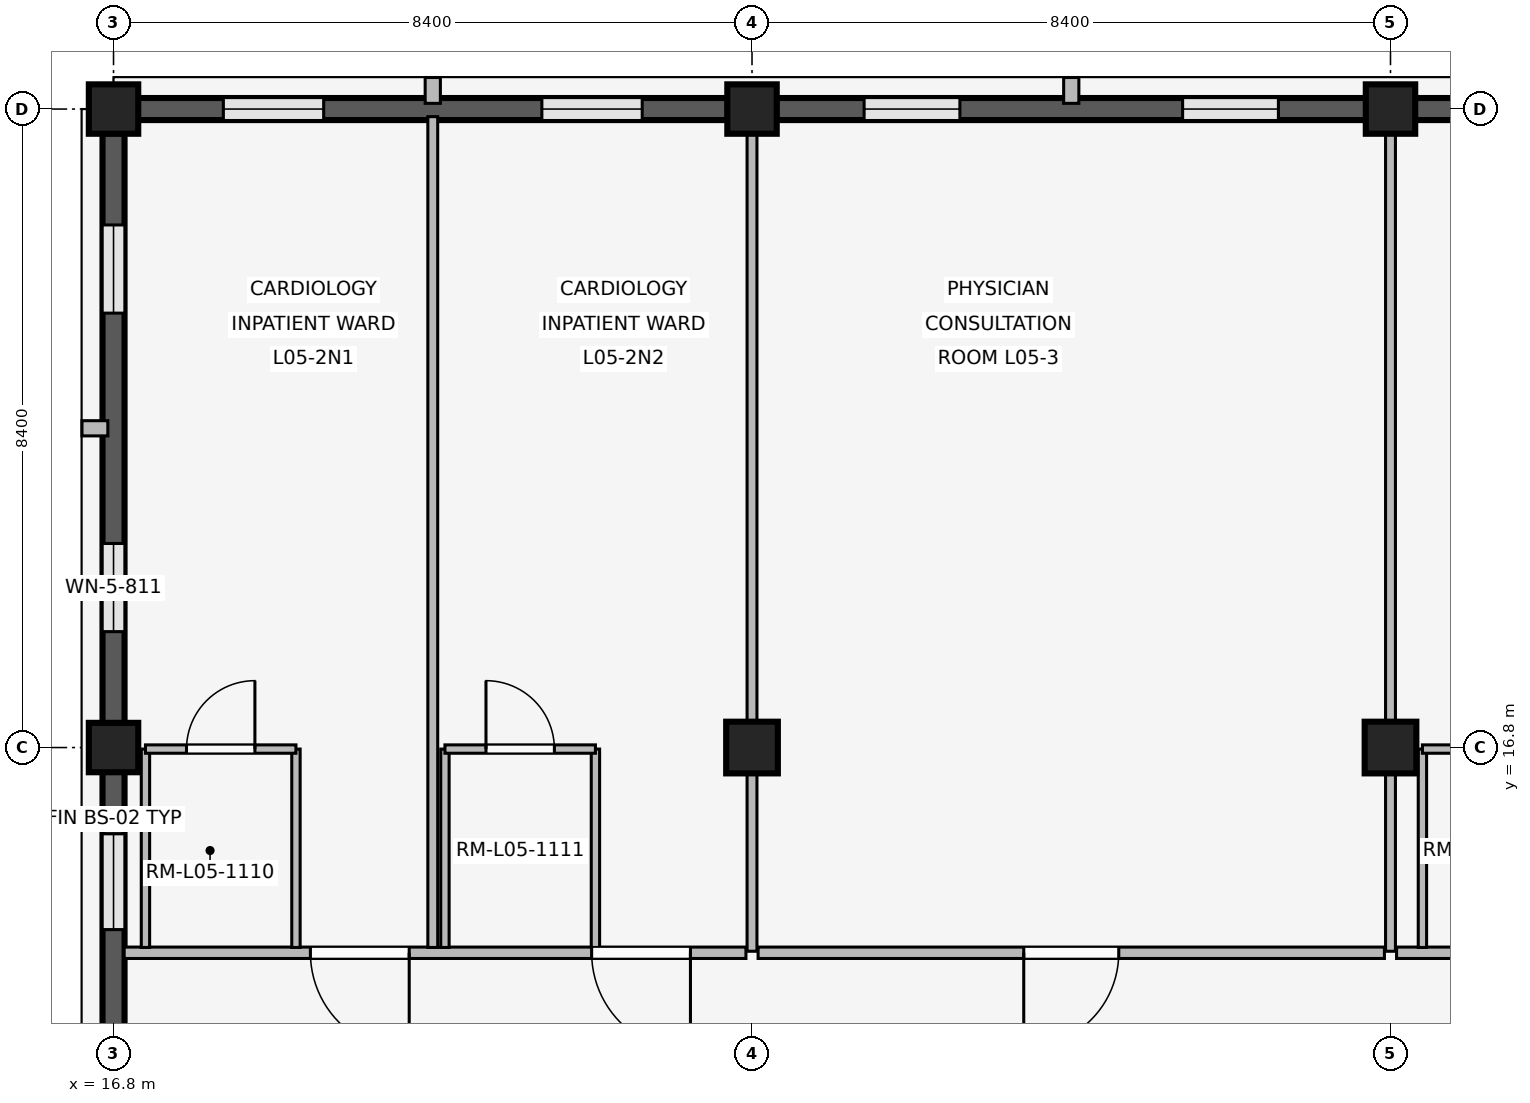
"""IFC4 building model, lengths in metres.
Left out: names, types, materials, properties, quantities, classifications, styles, units other than length and angle.
Written with IfcOpenShell. Run it as: python <this file> out.ifc"""

import sys

from ifc_helpers import new_model, si_unit, direction, frame, frame_2d, origin, origin_2d, place, context, subcontext, project, spatial, rectangle, extrude, element, fill, save


model = new_model("IFC4")
c1 = context("Model", 3, precision=1e-05, world=origin(), true_north=direction((0.0, 1.0)))
c2 = subcontext(c1, "Body", "Model", "MODEL_VIEW")
j1 = project(units=[si_unit("LENGTHUNIT", "METRE"), si_unit("PLANEANGLEUNIT", "RADIAN")], contexts=[c1])
p1 = place(None, origin())
s1 = spatial("IfcSite", under=j1, at=p1, CompositionType="ELEMENT")
p2 = place(p1, origin())
s2 = spatial("IfcBuilding", under=s1, at=p2, CompositionType="ELEMENT")
p3 = place(p2, frame((0.0, 0.0, 20.4)))
s3 = spatial("IfcBuildingStorey", under=s2, at=p3, CompositionType="ELEMENT", Elevation=20.4)
for number, where, z_axis, x_axis in (
    (1, (16.8, 16.8, 0.0), (0.0, 0.0, 1.0), (1.0, 0.0, 0.0)),
    (2, (16.8, 25.2, 0.0), (0.0, 0.0, 1.0), (1.0, 0.0, 0.0)),
):
    element("IfcColumn", number, at=place(p3, frame(where, z_axis=z_axis, x_axis=x_axis)), inside=s3, PredefinedType="COLUMN", context=c2, shape_type="SweptSolid", body=[
        extrude(rectangle(XDim=0.65, YDim=0.65, at=origin_2d()), origin(), (0.0, 0.0, 1.0), 4.2),
    ])
p4 = place(p3, frame((25.2, 16.8, 0.0), z_axis=(0.0, 0.0, 1.0), x_axis=(1.0, 0.0, 0.0)))
e3 = element("IfcColumn", 3, at=p4, inside=s3, PredefinedType="COLUMN", context=c2, shape_type="SweptSolid", body=[
    extrude(rectangle(XDim=0.68, YDim=0.68, at=origin_2d()), origin(), (0.0, 0.0, 1.0), 4.2),
])
p5 = place(p3, frame((25.2, 25.2, 0.0), z_axis=(0.0, 0.0, 1.0), x_axis=(1.0, 0.0, 0.0)))
e4 = element("IfcColumn", 4, at=p5, inside=s3, PredefinedType="COLUMN", context=c2, shape_type="SweptSolid", body=[
    extrude(rectangle(XDim=0.65, YDim=0.65, at=origin_2d()), origin(), (0.0, 0.0, 1.0), 4.2),
])
p6 = place(p3, frame((33.6, 16.8, 0.0), z_axis=(0.0, 0.0, 1.0), x_axis=(1.0, 0.0, 0.0)))
e5 = element("IfcColumn", 5, at=p6, inside=s3, PredefinedType="COLUMN", context=c2, shape_type="SweptSolid", body=[
    extrude(rectangle(XDim=0.68, YDim=0.68, at=origin_2d()), origin(), (0.0, 0.0, 1.0), 4.2),
])
p7 = place(p3, frame((33.6, 25.2, 0.0), z_axis=(0.0, 0.0, 1.0), x_axis=(1.0, 0.0, 0.0)))
e6 = element("IfcColumn", 6, at=p7, inside=s3, PredefinedType="COLUMN", context=c2, shape_type="SweptSolid", body=[
    extrude(rectangle(XDim=0.65, YDim=0.65, at=origin_2d()), origin(), (0.0, 0.0, 1.0), 4.2),
])
p8 = place(p3, frame((16.8, 8.72, 0.0), z_axis=(0.0, 0.0, 1.0), x_axis=(0.0, 1.0, 0.0)))
e7 = element("IfcWall", 7, at=p8, inside=s3, PredefinedType="SOLIDWALL", context=c2, shape_type="SweptSolid", body=[
    extrude(rectangle(XDim=7.76, YDim=0.29, at=frame_2d((3.88, 0.0))), origin(), (0.0, 0.0, 1.0), 3.34),
])
p9 = place(p8, frame((0.865, 0.0, 0.85)))
e8 = element("IfcOpeningElement", 8, at=p9, cuts=e7, PredefinedType="OPENING", context=c2, shape_type="SweptSolid", body=[
    extrude(rectangle(XDim=1.26, YDim=1.52, at=frame_2d((0.63, 0.76))), frame((0.0, 0.155, 0.0), z_axis=(0.0, -1.0, 0.0), x_axis=(1.0, 0.0, 0.0)), (0.0, 0.0, 1.0), 0.31),
])
p10 = place(p8, frame((5.685, 0.0, 0.85)))
e9 = element("IfcOpeningElement", 9, at=p10, cuts=e7, PredefinedType="OPENING", context=c2, shape_type="SweptSolid", body=[
    extrude(rectangle(XDim=1.26, YDim=1.52, at=frame_2d((0.63, 0.76))), frame((0.0, 0.155, 0.0), z_axis=(0.0, -1.0, 0.0), x_axis=(1.0, 0.0, 0.0)), (0.0, 0.0, 1.0), 0.31),
])
p11 = place(p3, frame((17.12, 25.2, 0.0), z_axis=(0.0, 0.0, 1.0), x_axis=(1.0, 0.0, 0.0)))
e10 = element("IfcWall", 10, at=p11, inside=s3, PredefinedType="SOLIDWALL", context=c2, shape_type="SweptSolid", body=[
    extrude(rectangle(XDim=7.76, YDim=0.29, at=frame_2d((3.88, 0.0))), origin(), (0.0, 0.0, 1.0), 3.34),
])
p12 = place(p11, frame((1.125, 0.0, 0.85)))
e11 = element("IfcOpeningElement", 11, at=p12, cuts=e10, PredefinedType="OPENING", context=c2, shape_type="SweptSolid", body=[
    extrude(rectangle(XDim=1.32, YDim=1.58, at=frame_2d((0.66, 0.79))), frame((0.0, 0.155, 0.0), z_axis=(0.0, -1.0, 0.0), x_axis=(1.0, 0.0, 0.0)), (0.0, 0.0, 1.0), 0.31),
])
p13 = place(p11, frame((5.315, 0.0, 0.85)))
e12 = element("IfcOpeningElement", 12, at=p13, cuts=e10, PredefinedType="OPENING", context=c2, shape_type="SweptSolid", body=[
    extrude(rectangle(XDim=1.32, YDim=1.58, at=frame_2d((0.66, 0.79))), frame((0.0, 0.155, 0.0), z_axis=(0.0, -1.0, 0.0), x_axis=(1.0, 0.0, 0.0)), (0.0, 0.0, 1.0), 0.31),
])
p14 = place(p3, frame((21.0, 25.275, 0.0), z_axis=(0.0, 0.0, 1.0), x_axis=(0.0, 1.0, 0.0)))
e13 = element("IfcWall", 13, at=p14, inside=s3, PredefinedType="ELEMENTEDWALL", context=c2, shape_type="SweptSolid", body=[
    extrude(rectangle(XDim=0.34, YDim=0.2, at=frame_2d((0.17, 0.0))), origin(), (0.0, 0.0, 1.0), 3.32),
])
p15 = place(p3, frame((16.8, 17.12, 0.0), z_axis=(0.0, 0.0, 1.0), x_axis=(0.0, 1.0, 0.0)))
e14 = element("IfcWall", 14, at=p15, inside=s3, PredefinedType="SOLIDWALL", context=c2, shape_type="SweptSolid", body=[
    extrude(rectangle(XDim=7.76, YDim=0.29, at=frame_2d((3.88, 0.0))), origin(), (0.0, 0.0, 1.0), 3.34),
])
p16 = place(p15, frame((1.205, 0.0, 0.85)))
e15 = element("IfcOpeningElement", 15, at=p16, cuts=e14, PredefinedType="OPENING", context=c2, shape_type="SweptSolid", body=[
    extrude(rectangle(XDim=1.16, YDim=1.48, at=frame_2d((0.58, 0.74))), frame((0.0, 0.155, 0.0), z_axis=(0.0, -1.0, 0.0), x_axis=(1.0, 0.0, 0.0)), (0.0, 0.0, 1.0), 0.31),
])
p17 = place(p15, frame((5.395, 0.0, 0.85)))
e16 = element("IfcOpeningElement", 16, at=p17, cuts=e14, PredefinedType="OPENING", context=c2, shape_type="SweptSolid", body=[
    extrude(rectangle(XDim=1.16, YDim=1.48, at=frame_2d((0.58, 0.74))), frame((0.0, 0.155, 0.0), z_axis=(0.0, -1.0, 0.0), x_axis=(1.0, 0.0, 0.0)), (0.0, 0.0, 1.0), 0.31),
])
p18 = place(p3, frame((16.725, 21.0, 0.0), z_axis=(0.0, 0.0, 1.0), x_axis=(-1.0, 0.0, 0.0)))
e17 = element("IfcWall", 17, at=p18, inside=s3, PredefinedType="ELEMENTEDWALL", context=c2, shape_type="SweptSolid", body=[
    extrude(rectangle(XDim=0.34, YDim=0.2, at=frame_2d((0.17, 0.0))), origin(), (0.0, 0.0, 1.0), 3.32),
])
p19 = place(p3, frame((25.52, 25.2, 0.0), z_axis=(0.0, 0.0, 1.0), x_axis=(1.0, 0.0, 0.0)))
e18 = element("IfcWall", 18, at=p19, inside=s3, PredefinedType="SOLIDWALL", context=c2, shape_type="SweptSolid", body=[
    extrude(rectangle(XDim=7.76, YDim=0.29, at=frame_2d((3.88, 0.0))), origin(), (0.0, 0.0, 1.0), 3.34),
])
p20 = place(p19, frame((1.155, 0.0, 0.85)))
e19 = element("IfcOpeningElement", 19, at=p20, cuts=e18, PredefinedType="OPENING", context=c2, shape_type="SweptSolid", body=[
    extrude(rectangle(XDim=1.26, YDim=1.52, at=frame_2d((0.63, 0.76))), frame((0.0, 0.155, 0.0), z_axis=(0.0, -1.0, 0.0), x_axis=(1.0, 0.0, 0.0)), (0.0, 0.0, 1.0), 0.31),
])
p21 = place(p19, frame((5.345, 0.0, 0.85)))
e20 = element("IfcOpeningElement", 20, at=p21, cuts=e18, PredefinedType="OPENING", context=c2, shape_type="SweptSolid", body=[
    extrude(rectangle(XDim=1.26, YDim=1.52, at=frame_2d((0.63, 0.76))), frame((0.0, 0.155, 0.0), z_axis=(0.0, -1.0, 0.0), x_axis=(1.0, 0.0, 0.0)), (0.0, 0.0, 1.0), 0.31),
])
p22 = place(p3, frame((29.4, 25.275, 0.0), z_axis=(0.0, 0.0, 1.0), x_axis=(0.0, 1.0, 0.0)))
e21 = element("IfcWall", 21, at=p22, inside=s3, PredefinedType="ELEMENTEDWALL", context=c2, shape_type="SweptSolid", body=[
    extrude(rectangle(XDim=0.34, YDim=0.2, at=frame_2d((0.17, 0.0))), origin(), (0.0, 0.0, 1.0), 3.32),
])
p23 = place(p3, frame((33.92, 25.2, 0.0), z_axis=(0.0, 0.0, 1.0), x_axis=(1.0, 0.0, 0.0)))
e22 = element("IfcWall", 22, at=p23, inside=s3, PredefinedType="SOLIDWALL", context=c2, shape_type="SweptSolid", body=[
    extrude(rectangle(XDim=7.76, YDim=0.29, at=frame_2d((3.88, 0.0))), origin(), (0.0, 0.0, 1.0), 3.34),
])
p24 = place(p23, frame((1.205, 0.0, 0.85)))
e23 = element("IfcOpeningElement", 23, at=p24, cuts=e22, PredefinedType="OPENING", context=c2, shape_type="SweptSolid", body=[
    extrude(rectangle(XDim=1.16, YDim=1.48, at=frame_2d((0.58, 0.74))), frame((0.0, 0.155, 0.0), z_axis=(0.0, -1.0, 0.0), x_axis=(1.0, 0.0, 0.0)), (0.0, 0.0, 1.0), 0.31),
])
p25 = place(p23, frame((5.395, 0.0, 0.85)))
e24 = element("IfcOpeningElement", 24, at=p25, cuts=e22, PredefinedType="OPENING", context=c2, shape_type="SweptSolid", body=[
    extrude(rectangle(XDim=1.16, YDim=1.48, at=frame_2d((0.58, 0.74))), frame((0.0, 0.155, 0.0), z_axis=(0.0, -1.0, 0.0), x_axis=(1.0, 0.0, 0.0)), (0.0, 0.0, 1.0), 0.31),
])
p26 = place(p3, frame((25.12, 14.1, 0.0), z_axis=(0.0, 0.0, 1.0), x_axis=(-1.0, 0.0, 0.0)))
e25 = element("IfcWall", 25, at=p26, inside=s3, PredefinedType="PARTITIONING", context=c2, shape_type="SweptSolid", body=[
    extrude(rectangle(XDim=8.18, YDim=0.15, at=frame_2d((4.09, 0.0))), origin(), (0.0, 0.0, 1.0), 3.32),
])
p27 = place(p26, frame((0.73, 0.0, 0.0)))
e26 = element("IfcOpeningElement", 26, at=p27, cuts=e25, PredefinedType="OPENING", context=c2, shape_type="SweptSolid", body=[
    extrude(rectangle(XDim=1.3, YDim=2.25, at=frame_2d((0.65, 1.125))), frame((0.0, 0.085, 0.0), z_axis=(0.0, -1.0, 0.0), x_axis=(1.0, 0.0, 0.0)), (0.0, 0.0, 1.0), 0.17),
])
p28 = place(p26, frame((4.43, 0.0, 0.0)))
e27 = element("IfcOpeningElement", 27, at=p28, cuts=e25, PredefinedType="OPENING", context=c2, shape_type="SweptSolid", body=[
    extrude(rectangle(XDim=1.3, YDim=2.25, at=frame_2d((0.65, 1.125))), frame((0.0, 0.085, 0.0), z_axis=(0.0, -1.0, 0.0), x_axis=(1.0, 0.0, 0.0)), (0.0, 0.0, 1.0), 0.17),
])
p29 = place(p3, frame((21.0, 14.17, 0.0), z_axis=(0.0, 0.0, 1.0), x_axis=(0.0, 1.0, 0.0)))
e28 = element("IfcWall", 28, at=p29, inside=s3, PredefinedType="PARTITIONING", context=c2, shape_type="SweptSolid", body=[
    extrude(rectangle(XDim=10.93, YDim=0.13, at=frame_2d((5.465, 0.0))), origin(), (0.0, 0.0, 1.0), 3.32),
])
for number, where, z_axis, x_axis in (
    (29, (17.22, 14.17, 0.0), (0.0, 0.0, 1.0), (0.0, 1.0, 0.0)),
    (30, (19.2, 14.17, 0.0), (0.0, 0.0, 1.0), (0.0, 1.0, 0.0)),
):
    element("IfcWall", number, at=place(p3, frame(where, z_axis=z_axis, x_axis=x_axis)), inside=s3, PredefinedType="PARTITIONING", context=c2, shape_type="SweptSolid", body=[
        extrude(rectangle(XDim=2.61, YDim=0.11, at=frame_2d((1.305, 0.0))), origin(), (0.0, 0.0, 1.0), 3.32),
    ])
p30 = place(p3, frame((17.22, 16.78, 0.0), z_axis=(0.0, 0.0, 1.0), x_axis=(1.0, 0.0, 0.0)))
e31 = element("IfcWall", 31, at=p30, inside=s3, PredefinedType="PARTITIONING", context=c2, shape_type="SweptSolid", body=[
    extrude(rectangle(XDim=1.98, YDim=0.11, at=frame_2d((0.99, 0.0))), origin(), (0.0, 0.0, 1.0), 3.32),
])
p31 = place(p30, frame((0.54, 0.0, 0.0)))
e32 = element("IfcOpeningElement", 32, at=p31, cuts=e31, PredefinedType="OPENING", context=c2, shape_type="SweptSolid", body=[
    extrude(rectangle(XDim=0.9, YDim=2.1, at=frame_2d((0.45, 1.05))), frame((0.0, 0.065, 0.0), z_axis=(0.0, -1.0, 0.0), x_axis=(1.0, 0.0, 0.0)), (0.0, 0.0, 1.0), 0.13),
])
for number, where, z_axis, x_axis in (
    (33, (21.16, 14.17, 0.0), (0.0, 0.0, 1.0), (0.0, 1.0, 0.0)),
    (34, (23.14, 14.17, 0.0), (0.0, 0.0, 1.0), (0.0, 1.0, 0.0)),
):
    element("IfcWall", number, at=place(p3, frame(where, z_axis=z_axis, x_axis=x_axis)), inside=s3, PredefinedType="PARTITIONING", context=c2, shape_type="SweptSolid", body=[
        extrude(rectangle(XDim=2.61, YDim=0.11, at=frame_2d((1.305, 0.0))), origin(), (0.0, 0.0, 1.0), 3.32),
    ])
p32 = place(p3, frame((21.16, 16.78, 0.0), z_axis=(0.0, 0.0, 1.0), x_axis=(1.0, 0.0, 0.0)))
e35 = element("IfcWall", 35, at=p32, inside=s3, PredefinedType="PARTITIONING", context=c2, shape_type="SweptSolid", body=[
    extrude(rectangle(XDim=1.98, YDim=0.11, at=frame_2d((0.99, 0.0))), origin(), (0.0, 0.0, 1.0), 3.32),
])
p33 = place(p32, frame((0.54, 0.0, 0.0)))
e36 = element("IfcOpeningElement", 36, at=p33, cuts=e35, PredefinedType="OPENING", context=c2, shape_type="SweptSolid", body=[
    extrude(rectangle(XDim=0.9, YDim=2.1, at=frame_2d((0.45, 1.05))), frame((0.0, 0.065, 0.0), z_axis=(0.0, -1.0, 0.0), x_axis=(1.0, 0.0, 0.0)), (0.0, 0.0, 1.0), 0.13),
])
p34 = place(p3, frame((25.2, 14.12, 0.0), z_axis=(0.0, 0.0, 1.0), x_axis=(0.0, 1.0, 0.0)))
e37 = element("IfcWall", 37, at=p34, inside=s3, PredefinedType="PARTITIONING", context=c2, shape_type="SweptSolid", body=[
    extrude(rectangle(XDim=10.94, YDim=0.13, at=frame_2d((5.47, 0.0))), origin(), (0.0, 0.0, 1.0), 3.32),
])
p35 = place(p3, frame((33.52, 14.1, 0.0), z_axis=(0.0, 0.0, 1.0), x_axis=(-1.0, 0.0, 0.0)))
e38 = element("IfcWall", 38, at=p35, inside=s3, PredefinedType="PARTITIONING", context=c2, shape_type="SweptSolid", body=[
    extrude(rectangle(XDim=8.24, YDim=0.15, at=frame_2d((4.12, 0.0))), origin(), (0.0, 0.0, 1.0), 3.32),
])
p36 = place(p35, frame((3.495, 0.0, 0.0)))
e39 = element("IfcOpeningElement", 39, at=p36, cuts=e38, PredefinedType="OPENING", context=c2, shape_type="SweptSolid", body=[
    extrude(rectangle(XDim=1.25, YDim=2.2, at=frame_2d((0.625, 1.1))), frame((0.0, 0.085, 0.0), z_axis=(0.0, -1.0, 0.0), x_axis=(1.0, 0.0, 0.0)), (0.0, 0.0, 1.0), 0.17),
])
p37 = place(p3, frame((33.6, 14.12, 0.0), z_axis=(0.0, 0.0, 1.0), x_axis=(0.0, 1.0, 0.0)))
e40 = element("IfcWall", 40, at=p37, inside=s3, PredefinedType="PARTITIONING", context=c2, shape_type="SweptSolid", body=[
    extrude(rectangle(XDim=10.94, YDim=0.13, at=frame_2d((5.47, 0.0))), origin(), (0.0, 0.0, 1.0), 3.32),
])
p38 = place(p3, frame((41.64, 14.1, 0.0), z_axis=(0.0, 0.0, 1.0), x_axis=(-1.0, 0.0, 0.0)))
e41 = element("IfcWall", 41, at=p38, inside=s3, PredefinedType="PARTITIONING", context=c2, shape_type="SweptSolid", body=[
    extrude(rectangle(XDim=7.96, YDim=0.15, at=frame_2d((3.98, 0.0))), origin(), (0.0, 0.0, 1.0), 3.32),
])
p39 = place(p38, frame((0.45, 0.0, 0.0)))
e42 = element("IfcOpeningElement", 42, at=p39, cuts=e41, PredefinedType="OPENING", context=c2, shape_type="SweptSolid", body=[
    extrude(rectangle(XDim=1.3, YDim=2.25, at=frame_2d((0.65, 1.125))), frame((0.0, 0.085, 0.0), z_axis=(0.0, -1.0, 0.0), x_axis=(1.0, 0.0, 0.0)), (0.0, 0.0, 1.0), 0.17),
])
p40 = place(p38, frame((4.15, 0.0, 0.0)))
e43 = element("IfcOpeningElement", 43, at=p40, cuts=e41, PredefinedType="OPENING", context=c2, shape_type="SweptSolid", body=[
    extrude(rectangle(XDim=1.3, YDim=2.25, at=frame_2d((0.65, 1.125))), frame((0.0, 0.085, 0.0), z_axis=(0.0, -1.0, 0.0), x_axis=(1.0, 0.0, 0.0)), (0.0, 0.0, 1.0), 0.17),
])
p41 = place(p3, frame((34.02, 14.17, 0.0), z_axis=(0.0, 0.0, 1.0), x_axis=(0.0, 1.0, 0.0)))
e44 = element("IfcWall", 44, at=p41, inside=s3, PredefinedType="PARTITIONING", context=c2, shape_type="SweptSolid", body=[
    extrude(rectangle(XDim=2.61, YDim=0.11, at=frame_2d((1.305, 0.0))), origin(), (0.0, 0.0, 1.0), 3.32),
])
p42 = place(p3, frame((34.02, 16.78, 0.0), z_axis=(0.0, 0.0, 1.0), x_axis=(1.0, 0.0, 0.0)))
e45 = element("IfcWall", 45, at=p42, inside=s3, PredefinedType="PARTITIONING", context=c2, shape_type="SweptSolid", body=[
    extrude(rectangle(XDim=1.98, YDim=0.11, at=frame_2d((0.99, 0.0))), origin(), (0.0, 0.0, 1.0), 3.32),
])
p43 = place(p42, frame((0.54, 0.0, 0.0)))
e46 = element("IfcOpeningElement", 46, at=p43, cuts=e45, PredefinedType="OPENING", context=c2, shape_type="SweptSolid", body=[
    extrude(rectangle(XDim=0.9, YDim=2.1, at=frame_2d((0.45, 1.05))), frame((0.0, 0.065, 0.0), z_axis=(0.0, -1.0, 0.0), x_axis=(1.0, 0.0, 0.0)), (0.0, 0.0, 1.0), 0.13),
])
p44 = place(p10, origin())
e47 = element("IfcWindow", 47, at=p44, inside=s3, PartitioningType="SINGLE_PANEL", PredefinedType="WINDOW", context=c2, shape_type="SweptSolid", body=[
    extrude(rectangle(XDim=1.26, YDim=1.52, at=frame_2d((0.63, 0.76))), frame((0.0, 0.03, 0.0), z_axis=(0.0, -1.0, 0.0), x_axis=(1.0, 0.0, 0.0)), (0.0, 0.0, 1.0), 0.06),
])
fill(e9, e47)
p45 = place(p12, origin())
e48 = element("IfcWindow", 48, at=p45, inside=s3, PartitioningType="SINGLE_PANEL", PredefinedType="WINDOW", context=c2, shape_type="SweptSolid", body=[
    extrude(rectangle(XDim=1.32, YDim=1.58, at=frame_2d((0.66, 0.79))), frame((0.0, 0.03, 0.0), z_axis=(0.0, -1.0, 0.0), x_axis=(1.0, 0.0, 0.0)), (0.0, 0.0, 1.0), 0.06),
])
fill(e11, e48)
p46 = place(p13, origin())
e49 = element("IfcWindow", 49, at=p46, inside=s3, PartitioningType="SINGLE_PANEL", PredefinedType="WINDOW", context=c2, shape_type="SweptSolid", body=[
    extrude(rectangle(XDim=1.32, YDim=1.58, at=frame_2d((0.66, 0.79))), frame((0.0, 0.03, 0.0), z_axis=(0.0, -1.0, 0.0), x_axis=(1.0, 0.0, 0.0)), (0.0, 0.0, 1.0), 0.06),
])
fill(e12, e49)
p47 = place(p16, origin())
e50 = element("IfcWindow", 50, at=p47, inside=s3, PartitioningType="SINGLE_PANEL", PredefinedType="WINDOW", context=c2, shape_type="SweptSolid", body=[
    extrude(rectangle(XDim=1.16, YDim=1.48, at=frame_2d((0.58, 0.74))), frame((0.0, 0.03, 0.0), z_axis=(0.0, -1.0, 0.0), x_axis=(1.0, 0.0, 0.0)), (0.0, 0.0, 1.0), 0.06),
])
fill(e15, e50)
p48 = place(p17, origin())
e51 = element("IfcWindow", 51, at=p48, inside=s3, PartitioningType="SINGLE_PANEL", PredefinedType="WINDOW", context=c2, shape_type="SweptSolid", body=[
    extrude(rectangle(XDim=1.16, YDim=1.48, at=frame_2d((0.58, 0.74))), frame((0.0, 0.03, 0.0), z_axis=(0.0, -1.0, 0.0), x_axis=(1.0, 0.0, 0.0)), (0.0, 0.0, 1.0), 0.06),
])
fill(e16, e51)
p49 = place(p20, origin())
e52 = element("IfcWindow", 52, at=p49, inside=s3, PartitioningType="SINGLE_PANEL", PredefinedType="WINDOW", context=c2, shape_type="SweptSolid", body=[
    extrude(rectangle(XDim=1.26, YDim=1.52, at=frame_2d((0.63, 0.76))), frame((0.0, 0.03, 0.0), z_axis=(0.0, -1.0, 0.0), x_axis=(1.0, 0.0, 0.0)), (0.0, 0.0, 1.0), 0.06),
])
fill(e19, e52)
p50 = place(p21, origin())
e53 = element("IfcWindow", 53, at=p50, inside=s3, PartitioningType="SINGLE_PANEL", PredefinedType="WINDOW", context=c2, shape_type="SweptSolid", body=[
    extrude(rectangle(XDim=1.26, YDim=1.52, at=frame_2d((0.63, 0.76))), frame((0.0, 0.03, 0.0), z_axis=(0.0, -1.0, 0.0), x_axis=(1.0, 0.0, 0.0)), (0.0, 0.0, 1.0), 0.06),
])
fill(e20, e53)
p51 = place(p27, origin())
e54 = element("IfcDoor", 54, at=p51, inside=s3, OperationType="SINGLE_SWING_LEFT", PredefinedType="DOOR", context=c2, shape_type="SweptSolid", body=[
    extrude(rectangle(XDim=1.3, YDim=2.25, at=frame_2d((0.65, 1.125))), frame((0.0, 0.025, 0.0), z_axis=(0.0, -1.0, 0.0), x_axis=(1.0, 0.0, 0.0)), (0.0, 0.0, 1.0), 0.05),
])
fill(e26, e54)
p52 = place(p28, origin())
e55 = element("IfcDoor", 55, at=p52, inside=s3, OperationType="SINGLE_SWING_LEFT", PredefinedType="DOOR", context=c2, shape_type="SweptSolid", body=[
    extrude(rectangle(XDim=1.3, YDim=2.25, at=frame_2d((0.65, 1.125))), frame((0.0, 0.025, 0.0), z_axis=(0.0, -1.0, 0.0), x_axis=(1.0, 0.0, 0.0)), (0.0, 0.0, 1.0), 0.05),
])
fill(e27, e55)
p53 = place(p31, origin())
e56 = element("IfcDoor", 56, at=p53, inside=s3, OperationType="SINGLE_SWING_RIGHT", PredefinedType="DOOR", context=c2, shape_type="SweptSolid", body=[
    extrude(rectangle(XDim=0.9, YDim=2.1, at=frame_2d((0.45, 1.05))), frame((0.0, 0.025, 0.0), z_axis=(0.0, -1.0, 0.0), x_axis=(1.0, 0.0, 0.0)), (0.0, 0.0, 1.0), 0.05),
])
fill(e32, e56)
p54 = place(p33, origin())
e57 = element("IfcDoor", 57, at=p54, inside=s3, OperationType="SINGLE_SWING_LEFT", PredefinedType="DOOR", context=c2, shape_type="SweptSolid", body=[
    extrude(rectangle(XDim=0.9, YDim=2.1, at=frame_2d((0.45, 1.05))), frame((0.0, 0.025, 0.0), z_axis=(0.0, -1.0, 0.0), x_axis=(1.0, 0.0, 0.0)), (0.0, 0.0, 1.0), 0.05),
])
fill(e36, e57)
p55 = place(p36, origin())
e58 = element("IfcDoor", 58, at=p55, inside=s3, OperationType="SINGLE_SWING_RIGHT", PredefinedType="DOOR", context=c2, shape_type="SweptSolid", body=[
    extrude(rectangle(XDim=1.25, YDim=2.2, at=frame_2d((0.625, 1.1))), frame((0.0, 0.025, 0.0), z_axis=(0.0, -1.0, 0.0), x_axis=(1.0, 0.0, 0.0)), (0.0, 0.0, 1.0), 0.05),
])
fill(e39, e58)
save(model, sys.argv[1])
